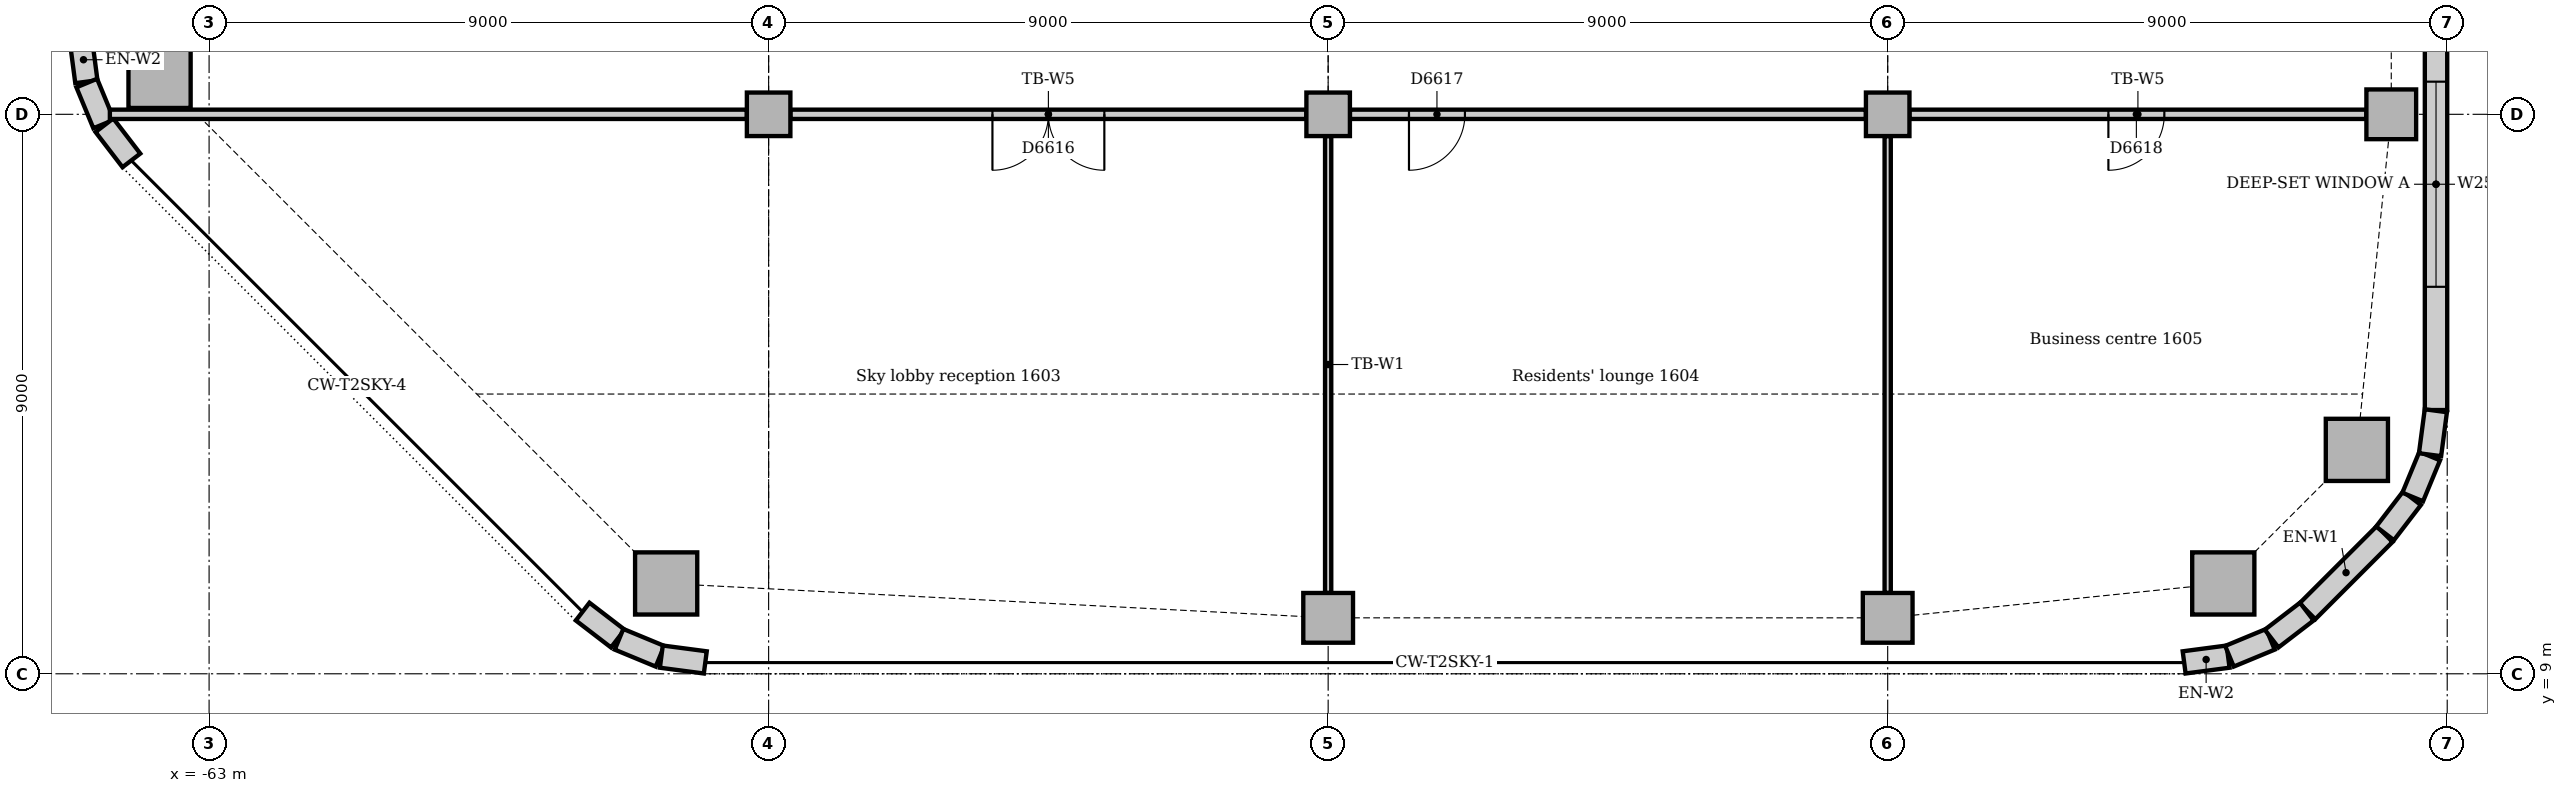
"""IFC4 building model, lengths in metres.
Left out: names, types, materials, properties, quantities, classifications, styles, units other than length and angle.
Written with IfcOpenShell. Run it as: python <this file> out.ifc"""

import sys

from ifc_helpers import new_model, si_unit, direction, frame, frame_2d, origin, origin_2d, place, context, subcontext, project, spatial, rectangle, extrude, element, fill, save


model = new_model("IFC4")
c1 = context("Model", 3, precision=1e-05, world=origin(), true_north=direction((0.0, 1.0)))
c2 = subcontext(c1, "Body", "Model", "MODEL_VIEW")
j1 = project(units=[si_unit("LENGTHUNIT", "METRE"), si_unit("PLANEANGLEUNIT", "RADIAN")], contexts=[c1])
p1 = place(None, origin())
s1 = spatial("IfcSite", under=j1, at=p1, CompositionType="ELEMENT")
p2 = place(p1, origin())
s2 = spatial("IfcBuilding", under=s1, at=p2, CompositionType="ELEMENT")
p3 = place(p2, frame((0.0, 0.0, 71.0)))
s3 = spatial("IfcBuildingStorey", under=s2, at=p3, CompositionType="ELEMENT", Elevation=71.0)
for number, where, z_axis, x_axis in (
    (1, (-55.648, 10.453, 0.0), (0.0, 0.0, 1.0), (1.0, 0.0, 0.0)),
    (2, (-30.602, 10.453, 0.0), (0.0, 0.0, 1.0), (1.0, 0.0, 0.0)),
    (3, (-28.453, 12.602, 0.0), (0.0, 0.0, 1.0), (1.0, 0.0, 0.0)),
    (4, (-63.797, 18.602, 0.0), (0.0, 0.0, 1.0), (1.0, 0.0, 0.0)),
):
    element("IfcColumn", number, at=place(p3, frame(where, z_axis=z_axis, x_axis=x_axis)), inside=s3, PredefinedType="COLUMN", context=c2, shape_type="SweptSolid", body=[
        extrude(rectangle(XDim=1.0, YDim=1.0, at=origin_2d()), origin(), (0.0, 0.0, 1.0), 3.85),
    ])
for number, where, z_axis, x_axis in (
    (5, (-45.0, 9.9, 0.0), (0.0, 0.0, 1.0), (1.0, 0.0, 0.0)),
    (6, (-36.0, 9.9, 0.0), (0.0, 0.0, 1.0), (1.0, 0.0, 0.0)),
    (7, (-27.9, 18.0, 0.0), (0.0, 0.0, 1.0), (1.0, 0.0, 0.0)),
):
    element("IfcColumn", number, at=place(p3, frame(where, z_axis=z_axis, x_axis=x_axis)), inside=s3, PredefinedType="COLUMN", context=c2, shape_type="SweptSolid", body=[
        extrude(rectangle(XDim=0.8, YDim=0.8, at=origin_2d()), origin(), (0.0, 0.0, 1.0), 3.85),
    ])
for number, where, z_axis, x_axis in (
    (8, (-54.0, 18.0, 0.0), (0.0, 0.0, 1.0), (1.0, 0.0, 0.0)),
    (9, (-45.0, 18.0, 0.0), (0.0, 0.0, 1.0), (1.0, 0.0, 0.0)),
    (10, (-36.0, 18.0, 0.0), (0.0, 0.0, 1.0), (1.0, 0.0, 0.0)),
):
    element("IfcColumn", number, at=place(p3, frame(where, z_axis=z_axis, x_axis=x_axis)), inside=s3, PredefinedType="COLUMN", context=c2, shape_type="SweptSolid", body=[
        extrude(rectangle(XDim=0.7, YDim=0.7, at=origin_2d()), origin(), (0.0, 0.0, 1.0), 3.85),
    ])
p4 = place(p3, frame((-29.249, 10.006, 0.0), z_axis=(0.0, 0.0, 1.0), x_axis=(0.707106781187, 0.707106781187, 0.0)))
e11 = element("IfcWall", 11, at=p4, inside=s3, PredefinedType="STANDARD", context=c2, shape_type="SweptSolid", body=[
    extrude(rectangle(XDim=1.757, YDim=0.36, at=frame_2d((0.879, 0.0))), origin(), (0.0, 0.0, 1.0), 3.85),
])
p5 = place(p3, frame((-27.18, 13.243, 0.0), z_axis=(0.0, 0.0, 1.0), x_axis=(0.0, 1.0, 0.0)))
e12 = element("IfcWall", 12, at=p5, inside=s3, PredefinedType="STANDARD", context=c2, shape_type="SweptSolid", body=[
    extrude(rectangle(XDim=7.757, YDim=0.36, at=frame_2d((3.879, 0.0))), origin(), (0.0, 0.0, 1.0), 3.85),
])
p6 = place(p5, frame((1.982, 0.0, 0.9)))
e13 = element("IfcOpeningElement", 13, at=p6, cuts=e12, PredefinedType="OPENING", context=c2, shape_type="SweptSolid", body=[
    extrude(rectangle(XDim=3.3, YDim=1.6, at=frame_2d((1.65, 0.8))), frame((0.0, 0.19, 0.0), z_axis=(0.0, -1.0, 0.0), x_axis=(1.0, 0.0, 0.0)), (0.0, 0.0, 1.0), 0.38),
])
for number, where, z_axis, x_axis in (
    (14, (-31.231, 9.183, 0.0), (0.0, 0.0, 1.0), (0.991, 0.131, 0.0)),
    (15, (-30.503, 9.282, 0.0), (0.0, 0.0, 1.0), (0.924, 0.383, 0.0)),
):
    element("IfcWall", number, at=place(p3, frame(where, z_axis=z_axis, x_axis=x_axis)), inside=s3, PredefinedType="STANDARD", context=c2, shape_type="SweptSolid", body=[
        extrude(rectangle(XDim=0.713, YDim=0.36, at=frame_2d((0.356, 0.0))), origin(), (0.0, 0.0, 1.0), 3.85),
    ])
for number, where, z_axis, x_axis in (
    (16, (-29.825, 9.566, 0.0), (0.0, 0.0, 1.0), (0.793, 0.609, 0.0)),
    (17, (-28.0, 11.259, 0.0), (0.0, 0.0, 1.0), (0.609, 0.793, 0.0)),
):
    element("IfcWall", number, at=place(p3, frame(where, z_axis=z_axis, x_axis=x_axis)), inside=s3, PredefinedType="STANDARD", context=c2, shape_type="SweptSolid", body=[
        extrude(rectangle(XDim=0.713, YDim=0.36, at=frame_2d((0.357, 0.0))), origin(), (0.0, 0.0, 1.0), 3.85),
    ])
for number, where, z_axis, x_axis in (
    (18, (-27.555, 11.844, 0.0), (0.0, 0.0, 1.0), (0.383, 0.924, 0.0)),
    (19, (-27.276, 12.524, 0.0), (0.0, 0.0, 1.0), (0.131, 0.991, 0.0)),
    (20, (-65.067, 19.231, 0.0), (0.0, 0.0, 1.0), (0.131, -0.991, 0.0)),
    (21, (-64.968, 18.503, 0.0), (0.0, 0.0, 1.0), (0.383, -0.924, 0.0)),
):
    element("IfcWall", number, at=place(p3, frame(where, z_axis=z_axis, x_axis=x_axis)), inside=s3, PredefinedType="STANDARD", context=c2, shape_type="SweptSolid", body=[
        extrude(rectangle(XDim=0.713, YDim=0.36, at=frame_2d((0.356, 0.0))), origin(), (0.0, 0.0, 1.0), 3.85),
    ])
for number, where, z_axis, x_axis in (
    (22, (-64.684, 17.825, 0.0), (0.0, 0.0, 1.0), (0.609, -0.793, 0.0)),
    (23, (-56.991, 10.0, 0.0), (0.0, 0.0, 1.0), (0.793, -0.609, 0.0)),
):
    element("IfcWall", number, at=place(p3, frame(where, z_axis=z_axis, x_axis=x_axis)), inside=s3, PredefinedType="STANDARD", context=c2, shape_type="SweptSolid", body=[
        extrude(rectangle(XDim=0.713, YDim=0.36, at=frame_2d((0.357, 0.0))), origin(), (0.0, 0.0, 1.0), 3.85),
    ])
for number, where, z_axis, x_axis in (
    (24, (-56.406, 9.555, 0.0), (0.0, 0.0, 1.0), (0.924, -0.383, 0.0)),
    (25, (-55.726, 9.276, 0.0), (0.0, 0.0, 1.0), (0.991, -0.131, 0.0)),
):
    element("IfcWall", number, at=place(p3, frame(where, z_axis=z_axis, x_axis=x_axis)), inside=s3, PredefinedType="STANDARD", context=c2, shape_type="SweptSolid", body=[
        extrude(rectangle(XDim=0.713, YDim=0.36, at=frame_2d((0.356, 0.0))), origin(), (0.0, 0.0, 1.0), 3.85),
    ])
p7 = place(p3, frame((-35.65, 18.0, 0.0), z_axis=(0.0, 0.0, 1.0), x_axis=(1.0, 0.0, 0.0)))
e26 = element("IfcWall", 26, at=p7, inside=s3, PredefinedType="PARTITIONING", context=c2, shape_type="SweptSolid", body=[
    extrude(rectangle(XDim=7.35, YDim=0.15, at=frame_2d((3.675, 0.0))), origin(), (0.0, 0.0, 1.0), 3.158),
])
p8 = place(p7, frame((3.2, 0.0, 0.0)))
e27 = element("IfcOpeningElement", 27, at=p8, cuts=e26, PredefinedType="OPENING", context=c2, shape_type="SweptSolid", body=[
    extrude(rectangle(XDim=0.9, YDim=2.1, at=frame_2d((0.45, 1.05))), frame((0.0, 0.085, 0.0), z_axis=(0.0, -1.0, 0.0), x_axis=(1.0, 0.0, 0.0)), (0.0, 0.0, 1.0), 0.17),
])
p9 = place(p3, frame((-44.65, 18.0, 0.0), z_axis=(0.0, 0.0, 1.0), x_axis=(1.0, 0.0, 0.0)))
e28 = element("IfcWall", 28, at=p9, inside=s3, PredefinedType="PARTITIONING", context=c2, shape_type="SweptSolid", body=[
    extrude(rectangle(XDim=8.3, YDim=0.15, at=frame_2d((4.15, 0.0))), origin(), (0.0, 0.0, 1.0), 3.158),
])
p10 = place(p9, frame((0.95, 0.0, 0.0)))
e29 = element("IfcOpeningElement", 29, at=p10, cuts=e28, PredefinedType="OPENING", context=c2, shape_type="SweptSolid", body=[
    extrude(rectangle(XDim=0.9, YDim=2.1, at=frame_2d((0.45, 1.05))), frame((0.0, 0.085, 0.0), z_axis=(0.0, -1.0, 0.0), x_axis=(1.0, 0.0, 0.0)), (0.0, 0.0, 1.0), 0.17),
])
p11 = place(p3, frame((-53.65, 18.0, 0.0), z_axis=(0.0, 0.0, 1.0), x_axis=(1.0, 0.0, 0.0)))
e30 = element("IfcWall", 30, at=p11, inside=s3, PredefinedType="PARTITIONING", context=c2, shape_type="SweptSolid", body=[
    extrude(rectangle(XDim=8.3, YDim=0.15, at=frame_2d((4.15, 0.0))), origin(), (0.0, 0.0, 1.0), 3.158),
])
p12 = place(p11, frame((3.25, 0.0, 0.0)))
e31 = element("IfcOpeningElement", 31, at=p12, cuts=e30, PredefinedType="OPENING", context=c2, shape_type="SweptSolid", body=[
    extrude(rectangle(XDim=1.8, YDim=2.1, at=frame_2d((0.9, 1.05))), frame((0.0, 0.085, 0.0), z_axis=(0.0, -1.0, 0.0), x_axis=(1.0, 0.0, 0.0)), (0.0, 0.0, 1.0), 0.17),
])
p13 = place(p3, frame((-64.596, 18.0, 0.0), z_axis=(0.0, 0.0, 1.0), x_axis=(1.0, 0.0, 0.0)))
e32 = element("IfcWall", 32, at=p13, inside=s3, PredefinedType="PARTITIONING", context=c2, shape_type="SweptSolid", body=[
    extrude(rectangle(XDim=10.246, YDim=0.15, at=frame_2d((5.123, 0.0))), origin(), (0.0, 0.0, 1.0), 3.158),
])
for number, where, z_axis, x_axis in (
    (33, (-45.0, 10.3, 0.0), (0.0, 0.0, 1.0), (0.0, 1.0, 0.0)),
    (34, (-36.0, 10.3, 0.0), (0.0, 0.0, 1.0), (0.0, 1.0, 0.0)),
):
    element("IfcWall", number, at=place(p3, frame(where, z_axis=z_axis, x_axis=x_axis)), inside=s3, PredefinedType="PARTITIONING", context=c2, shape_type="SweptSolid", body=[
        extrude(rectangle(XDim=7.35, YDim=0.1, at=frame_2d((3.675, 0.0))), origin(), (0.0, 0.0, 1.0), 3.256),
    ])
p14 = place(p6, origin())
e35 = element("IfcWindow", 35, at=p14, inside=s3, PartitioningType="SINGLE_PANEL", PredefinedType="WINDOW", context=c2, shape_type="SweptSolid", body=[
    extrude(rectangle(XDim=3.3, YDim=1.6, at=frame_2d((1.65, 0.8))), frame((0.0, 0.13, 0.0), z_axis=(0.0, -1.0, 0.0), x_axis=(1.0, 0.0, 0.0)), (0.0, 0.0, 1.0), 0.06),
])
fill(e13, e35)
p15 = place(p12, frame((1.8, 0.0, 0.0), z_axis=(0.0, 0.0, 1.0), x_axis=(-1.0, 0.0, 0.0)))
e36 = element("IfcDoor", 36, at=p15, inside=s3, OperationType="DOUBLE_DOOR_DOUBLE_SWING", PredefinedType="DOOR", context=c2, shape_type="SweptSolid", body=[
    extrude(rectangle(XDim=1.8, YDim=2.1, at=frame_2d((0.9, 1.05))), frame((0.0, 0.025, 0.0), z_axis=(0.0, -1.0, 0.0), x_axis=(1.0, 0.0, 0.0)), (0.0, 0.0, 1.0), 0.05),
])
fill(e31, e36)
p16 = place(p10, frame((0.9, 0.0, 0.0), z_axis=(0.0, 0.0, 1.0), x_axis=(-1.0, 0.0, 0.0)))
e37 = element("IfcDoor", 37, at=p16, inside=s3, OperationType="SINGLE_SWING_RIGHT", PredefinedType="DOOR", context=c2, shape_type="SweptSolid", body=[
    extrude(rectangle(XDim=0.9, YDim=2.1, at=frame_2d((0.45, 1.05))), frame((0.0, 0.025, 0.0), z_axis=(0.0, -1.0, 0.0), x_axis=(1.0, 0.0, 0.0)), (0.0, 0.0, 1.0), 0.05),
])
fill(e29, e37)
p17 = place(p8, frame((0.9, 0.0, 0.0), z_axis=(0.0, 0.0, 1.0), x_axis=(-1.0, 0.0, 0.0)))
e38 = element("IfcDoor", 38, at=p17, inside=s3, OperationType="SINGLE_SWING_RIGHT", PredefinedType="DOOR", context=c2, shape_type="SweptSolid", body=[
    extrude(rectangle(XDim=0.9, YDim=2.1, at=frame_2d((0.45, 1.05))), frame((0.0, 0.025, 0.0), z_axis=(0.0, -1.0, 0.0), x_axis=(1.0, 0.0, 0.0)), (0.0, 0.0, 1.0), 0.05),
])
fill(e27, e38)
save(model, sys.argv[1])
